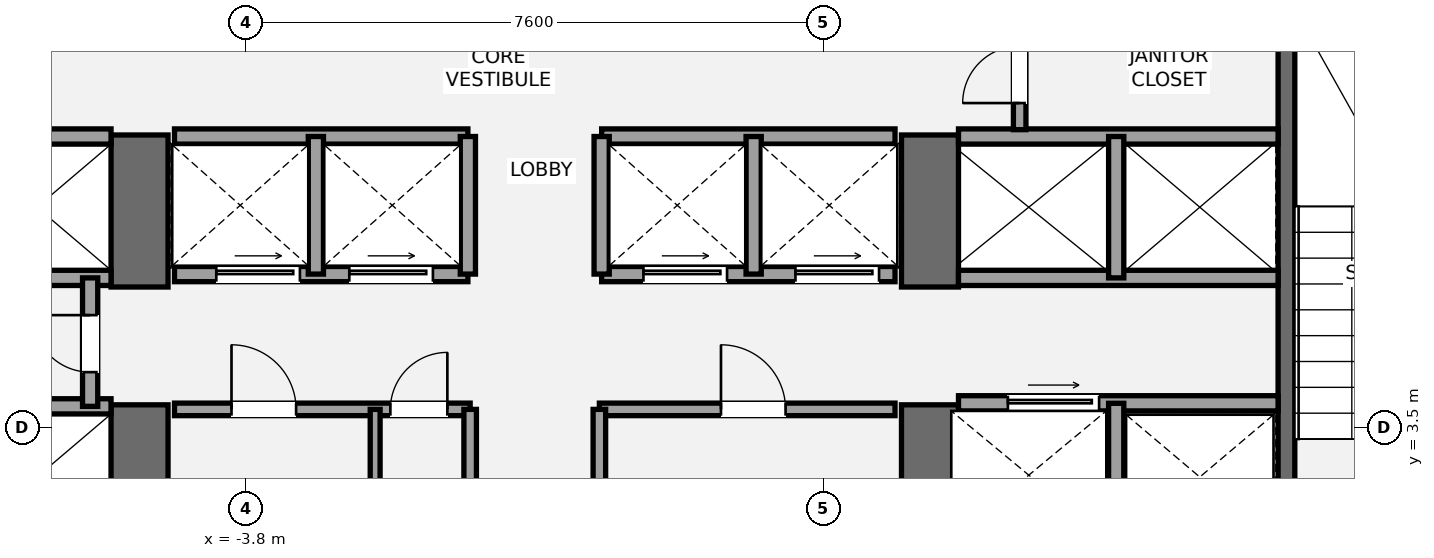
"""IFC4 building model, lengths in metres.
Left out: names, types, materials, properties, quantities, classifications, styles, units other than length and angle.
Written with IfcOpenShell. Run it as: python <this file> out.ifc"""

import sys

from ifc_helpers import new_model, si_unit, direction, frame, frame_2d, origin, place, context, subcontext, project, spatial, rectangle, extrude, element, fill, save


model = new_model("IFC4")
c1 = context("Model", 3, precision=1e-05, world=origin(), true_north=direction((0.0, 1.0)))
c2 = subcontext(c1, "Body", "Model", "MODEL_VIEW")
j1 = project(units=[si_unit("LENGTHUNIT", "METRE"), si_unit("PLANEANGLEUNIT", "RADIAN")], contexts=[c1])
p1 = place(None, origin())
s1 = spatial("IfcSite", under=j1, at=p1, CompositionType="ELEMENT")
p2 = place(p1, origin())
s2 = spatial("IfcBuilding", under=s1, at=p2, CompositionType="ELEMENT")
p3 = place(p2, frame((0.0, 0.0, 89.6)))
s3 = spatial("IfcBuildingStorey", under=s2, at=p3, CompositionType="ELEMENT", Elevation=89.6)
p4 = place(p3, frame((-5.2, 1.1, 0.0), z_axis=(0.0, 0.0, 1.0), x_axis=(0.0, 1.0, 0.0)))
e1 = element("IfcWall", 1, at=p4, inside=s3, PredefinedType="SHEAR", context=c2, shape_type="SweptSolid", body=[
    extrude(rectangle(XDim=2.7, YDim=0.75, at=frame_2d((1.35, 0.0))), origin(), (0.0, 0.0, 1.0), 3.5),
])
p5 = place(p3, frame((-5.2, 5.35, 0.0), z_axis=(0.0, 0.0, 1.0), x_axis=(0.0, 1.0, 0.0)))
e2 = element("IfcWall", 2, at=p5, inside=s3, PredefinedType="SHEAR", context=c2, shape_type="SweptSolid", body=[
    extrude(rectangle(XDim=2.0, YDim=0.75, at=frame_2d((1.0, 0.0))), origin(), (0.0, 0.0, 1.0), 3.5),
])
p6 = place(p3, frame((5.2, 1.1, 0.0), z_axis=(0.0, 0.0, 1.0), x_axis=(0.0, 1.0, 0.0)))
e3 = element("IfcWall", 3, at=p6, inside=s3, PredefinedType="SHEAR", context=c2, shape_type="SweptSolid", body=[
    extrude(rectangle(XDim=2.7, YDim=0.75, at=frame_2d((1.35, 0.0))), origin(), (0.0, 0.0, 1.0), 3.5),
])
p7 = place(p3, frame((5.2, 5.35, 0.0), z_axis=(0.0, 0.0, 1.0), x_axis=(0.0, 1.0, 0.0)))
e4 = element("IfcWall", 4, at=p7, inside=s3, PredefinedType="SHEAR", context=c2, shape_type="SweptSolid", body=[
    extrude(rectangle(XDim=2.0, YDim=0.75, at=frame_2d((1.0, 0.0))), origin(), (0.0, 0.0, 1.0), 3.5),
])
p8 = place(p3, frame((9.89, 1.85, 0.0), z_axis=(0.0, 0.0, 1.0), x_axis=(0.0, 1.0, 0.0)))
e5 = element("IfcWall", 5, at=p8, inside=s3, PredefinedType="SHEAR", context=c2, shape_type="SweptSolid", body=[
    extrude(rectangle(XDim=7.15, YDim=0.22, at=frame_2d((3.575, 0.0))), origin(), (0.0, 0.0, 1.0), 3.5),
])
for number, where, z_axis, x_axis in (
    (6, (-9.78, 3.78, 0.0), (0.0, 0.0, 1.0), (1.0, 0.0, 0.0)),
    (7, (-9.78, 5.47, 0.0), (0.0, 0.0, 1.0), (1.0, 0.0, 0.0)),
    (8, (-9.78, 7.33, 0.0), (0.0, 0.0, 1.0), (1.0, 0.0, 0.0)),
):
    element("IfcWall", number, at=place(p3, frame(where, z_axis=z_axis, x_axis=x_axis)), inside=s3, PredefinedType="SOLIDWALL", context=c2, shape_type="SweptSolid", body=[
        extrude(rectangle(XDim=4.205, YDim=0.2, at=frame_2d((2.103, 0.0))), origin(), (0.0, 0.0, 1.0), 3.31),
    ])
p9 = place(p3, frame((-5.85, 3.78, 0.0), z_axis=(0.0, 0.0, 1.0), x_axis=(0.0, 1.0, 0.0)))
e9 = element("IfcWall", 9, at=p9, inside=s3, PredefinedType="SOLIDWALL", context=c2, shape_type="SweptSolid", body=[
    extrude(rectangle(XDim=1.69, YDim=0.2, at=frame_2d((0.845, 0.0))), origin(), (0.0, 0.0, 1.0), 3.31),
])
p10 = place(p9, frame((0.45, 0.0, 0.0)))
e10 = element("IfcOpeningElement", 10, at=p10, cuts=e9, PredefinedType="OPENING", context=c2, shape_type="SweptSolid", body=[
    extrude(rectangle(XDim=0.75, YDim=2.1, at=frame_2d((0.375, 1.05))), frame((0.0, 0.11, 0.0), z_axis=(0.0, -1.0, 0.0), x_axis=(1.0, 0.0, 0.0)), (0.0, 0.0, 1.0), 0.22),
])
p11 = place(p3, frame((5.575, 3.82, 0.0), z_axis=(0.0, 0.0, 1.0), x_axis=(1.0, 0.0, 0.0)))
e11 = element("IfcWall", 11, at=p11, inside=s3, PredefinedType="SOLIDWALL", context=c2, shape_type="SweptSolid", body=[
    extrude(rectangle(XDim=4.205, YDim=0.2, at=frame_2d((2.103, 0.0))), origin(), (0.0, 0.0, 1.0), 3.31),
])
p12 = place(p11, frame((0.65, 0.0, 0.0)))
e12 = element("IfcOpeningElement", 12, at=p12, cuts=e11, PredefinedType="OPENING", context=c2, shape_type="SweptSolid", body=[
    extrude(rectangle(XDim=1.2, YDim=2.2, at=frame_2d((0.6, 1.1))), frame((0.0, 0.11, 0.0), z_axis=(0.0, -1.0, 0.0), x_axis=(1.0, 0.0, 0.0)), (0.0, 0.0, 1.0), 0.22),
])
p13 = place(p3, frame((7.65, 1.85, 0.0), z_axis=(0.0, 0.0, 1.0), x_axis=(0.0, 1.0, 0.0)))
e13 = element("IfcWall", 13, at=p13, inside=s3, PredefinedType="SOLIDWALL", context=c2, shape_type="SweptSolid", body=[
    extrude(rectangle(XDim=1.97, YDim=0.2, at=frame_2d((0.985, 0.0))), origin(), (0.0, 0.0, 1.0), 3.31),
])
for number, where, z_axis, x_axis in (
    (14, (5.575, 5.47, 0.0), (0.0, 0.0, 1.0), (1.0, 0.0, 0.0)),
    (15, (5.575, 7.33, 0.0), (0.0, 0.0, 1.0), (1.0, 0.0, 0.0)),
):
    element("IfcWall", number, at=place(p3, frame(where, z_axis=z_axis, x_axis=x_axis)), inside=s3, PredefinedType="SOLIDWALL", context=c2, shape_type="SweptSolid", body=[
        extrude(rectangle(XDim=4.205, YDim=0.2, at=frame_2d((2.103, 0.0))), origin(), (0.0, 0.0, 1.0), 3.31),
    ])
p14 = place(p3, frame((7.65, 5.47, 0.0), z_axis=(0.0, 0.0, 1.0), x_axis=(0.0, 1.0, 0.0)))
e16 = element("IfcWall", 16, at=p14, inside=s3, PredefinedType="SOLIDWALL", context=c2, shape_type="SweptSolid", body=[
    extrude(rectangle(XDim=1.86, YDim=0.2, at=frame_2d((0.93, 0.0))), origin(), (0.0, 0.0, 1.0), 3.31),
])
p15 = place(p3, frame((-4.74, 3.74, 0.0), z_axis=(0.0, 0.0, 1.0), x_axis=(1.0, 0.0, 0.0)))
e17 = element("IfcWall", 17, at=p15, inside=s3, PredefinedType="PARTITIONING", context=c2, shape_type="SweptSolid", body=[
    extrude(rectangle(XDim=3.89, YDim=0.165, at=frame_2d((1.945, 0.0))), origin(), (0.0, 0.0, 1.0), 3.31),
])
p16 = place(p15, frame((0.75, 0.0, 0.0)))
e18 = element("IfcOpeningElement", 18, at=p16, cuts=e17, PredefinedType="OPENING", context=c2, shape_type="SweptSolid", body=[
    extrude(rectangle(XDim=0.85, YDim=2.1, at=frame_2d((0.425, 1.05))), frame((0.0, 0.093, 0.0), z_axis=(0.0, -1.0, 0.0), x_axis=(1.0, 0.0, 0.0)), (0.0, 0.0, 1.0), 0.185),
])
p17 = place(p15, frame((2.84, 0.0, 0.0)))
e19 = element("IfcOpeningElement", 19, at=p17, cuts=e17, PredefinedType="OPENING", context=c2, shape_type="SweptSolid", body=[
    extrude(rectangle(XDim=0.75, YDim=2.1, at=frame_2d((0.375, 1.05))), frame((0.0, 0.093, 0.0), z_axis=(0.0, -1.0, 0.0), x_axis=(1.0, 0.0, 0.0)), (0.0, 0.0, 1.0), 0.185),
])
p18 = place(p3, frame((-0.85, 1.92, 0.0), z_axis=(0.0, 0.0, 1.0), x_axis=(0.0, 1.0, 0.0)))
e20 = element("IfcWall", 20, at=p18, inside=s3, PredefinedType="PARTITIONING", context=c2, shape_type="SweptSolid", body=[
    extrude(rectangle(XDim=1.82, YDim=0.165, at=frame_2d((0.91, 0.0))), origin(), (0.0, 0.0, 1.0), 3.31),
])
p19 = place(p3, frame((0.85, 3.74, 0.0), z_axis=(0.0, 0.0, 1.0), x_axis=(1.0, 0.0, 0.0)))
e21 = element("IfcWall", 21, at=p19, inside=s3, PredefinedType="PARTITIONING", context=c2, shape_type="SweptSolid", body=[
    extrude(rectangle(XDim=3.89, YDim=0.165, at=frame_2d((1.945, 0.0))), origin(), (0.0, 0.0, 1.0), 3.31),
])
p20 = place(p19, frame((1.6, 0.0, 0.0)))
e22 = element("IfcOpeningElement", 22, at=p20, cuts=e21, PredefinedType="OPENING", context=c2, shape_type="SweptSolid", body=[
    extrude(rectangle(XDim=0.85, YDim=2.1, at=frame_2d((0.425, 1.05))), frame((0.0, 0.093, 0.0), z_axis=(0.0, -1.0, 0.0), x_axis=(1.0, 0.0, 0.0)), (0.0, 0.0, 1.0), 0.185),
])
p21 = place(p3, frame((0.85, 1.92, 0.0), z_axis=(0.0, 0.0, 1.0), x_axis=(0.0, 1.0, 0.0)))
e23 = element("IfcWall", 23, at=p21, inside=s3, PredefinedType="PARTITIONING", context=c2, shape_type="SweptSolid", body=[
    extrude(rectangle(XDim=1.82, YDim=0.165, at=frame_2d((0.91, 0.0))), origin(), (0.0, 0.0, 1.0), 3.31),
])
p22 = place(p3, frame((-2.1, 1.92, 0.0), z_axis=(0.0, 0.0, 1.0), x_axis=(0.0, 1.0, 0.0)))
e24 = element("IfcWall", 24, at=p22, inside=s3, PredefinedType="PARTITIONING", context=c2, shape_type="SweptSolid", body=[
    extrude(rectangle(XDim=1.82, YDim=0.13, at=frame_2d((0.91, 0.0))), origin(), (0.0, 0.0, 1.0), 3.31),
])
p23 = place(p3, frame((-4.74, 5.52, 0.0), z_axis=(0.0, 0.0, 1.0), x_axis=(1.0, 0.0, 0.0)))
e25 = element("IfcWall", 25, at=p23, inside=s3, PredefinedType="SOLIDWALL", context=c2, shape_type="SweptSolid", body=[
    extrude(rectangle(XDim=3.86, YDim=0.2, at=frame_2d((1.93, 0.0))), origin(), (0.0, 0.0, 1.0), 3.31),
])
p24 = place(p23, frame((0.55, 0.0, 0.0)))
e26 = element("IfcOpeningElement", 26, at=p24, cuts=e25, PredefinedType="OPENING", context=c2, shape_type="SweptSolid", body=[
    extrude(rectangle(XDim=1.1, YDim=2.2, at=frame_2d((0.55, 1.1))), frame((0.0, 0.11, 0.0), z_axis=(0.0, -1.0, 0.0), x_axis=(1.0, 0.0, 0.0)), (0.0, 0.0, 1.0), 0.22),
])
p25 = place(p23, frame((2.3, 0.0, 0.0)))
e27 = element("IfcOpeningElement", 27, at=p25, cuts=e25, PredefinedType="OPENING", context=c2, shape_type="SweptSolid", body=[
    extrude(rectangle(XDim=1.1, YDim=2.2, at=frame_2d((0.55, 1.1))), frame((0.0, 0.11, 0.0), z_axis=(0.0, -1.0, 0.0), x_axis=(1.0, 0.0, 0.0)), (0.0, 0.0, 1.0), 0.22),
])
p26 = place(p3, frame((0.88, 5.52, 0.0), z_axis=(0.0, 0.0, 1.0), x_axis=(1.0, 0.0, 0.0)))
e28 = element("IfcWall", 28, at=p26, inside=s3, PredefinedType="SOLIDWALL", context=c2, shape_type="SweptSolid", body=[
    extrude(rectangle(XDim=3.86, YDim=0.2, at=frame_2d((1.93, 0.0))), origin(), (0.0, 0.0, 1.0), 3.31),
])
p27 = place(p26, frame((0.55, 0.0, 0.0)))
e29 = element("IfcOpeningElement", 29, at=p27, cuts=e28, PredefinedType="OPENING", context=c2, shape_type="SweptSolid", body=[
    extrude(rectangle(XDim=1.1, YDim=2.2, at=frame_2d((0.55, 1.1))), frame((0.0, 0.11, 0.0), z_axis=(0.0, -1.0, 0.0), x_axis=(1.0, 0.0, 0.0)), (0.0, 0.0, 1.0), 0.22),
])
p28 = place(p26, frame((2.55, 0.0, 0.0)))
e30 = element("IfcOpeningElement", 30, at=p28, cuts=e28, PredefinedType="OPENING", context=c2, shape_type="SweptSolid", body=[
    extrude(rectangle(XDim=1.1, YDim=2.2, at=frame_2d((0.55, 1.1))), frame((0.0, 0.11, 0.0), z_axis=(0.0, -1.0, 0.0), x_axis=(1.0, 0.0, 0.0)), (0.0, 0.0, 1.0), 0.22),
])
for number, where, z_axis, x_axis in (
    (31, (-4.74, 7.33, 0.0), (0.0, 0.0, 1.0), (1.0, 0.0, 0.0)),
    (32, (0.88, 7.33, 0.0), (0.0, 0.0, 1.0), (1.0, 0.0, 0.0)),
):
    element("IfcWall", number, at=place(p3, frame(where, z_axis=z_axis, x_axis=x_axis)), inside=s3, PredefinedType="SOLIDWALL", context=c2, shape_type="SweptSolid", body=[
        extrude(rectangle(XDim=3.86, YDim=0.2, at=frame_2d((1.93, 0.0))), origin(), (0.0, 0.0, 1.0), 3.31),
    ])
for number, where, z_axis, x_axis in (
    (33, (-2.88, 5.52, 0.0), (0.0, 0.0, 1.0), (0.0, 1.0, 0.0)),
    (34, (2.88, 5.52, 0.0), (0.0, 0.0, 1.0), (0.0, 1.0, 0.0)),
    (35, (-0.88, 5.52, 0.0), (0.0, 0.0, 1.0), (0.0, 1.0, 0.0)),
    (36, (0.88, 5.52, 0.0), (0.0, 0.0, 1.0), (0.0, 1.0, 0.0)),
):
    element("IfcWall", number, at=place(p3, frame(where, z_axis=z_axis, x_axis=x_axis)), inside=s3, PredefinedType="SOLIDWALL", context=c2, shape_type="SweptSolid", body=[
        extrude(rectangle(XDim=1.81, YDim=0.2, at=frame_2d((0.905, 0.0))), origin(), (0.0, 0.0, 1.0), 3.31),
    ])
p29 = place(p3, frame((6.38, 7.42, 0.0), z_axis=(0.0, 0.0, 1.0), x_axis=(0.0, 1.0, 0.0)))
e37 = element("IfcWall", 37, at=p29, inside=s3, PredefinedType="PARTITIONING", context=c2, shape_type="SweptSolid", body=[
    extrude(rectangle(XDim=1.58, YDim=0.165, at=frame_2d((0.79, 0.0))), origin(), (0.0, 0.0, 1.0), 3.31),
])
p30 = place(p29, frame((0.35, 0.0, 0.0)))
e38 = element("IfcOpeningElement", 38, at=p30, cuts=e37, PredefinedType="OPENING", context=c2, shape_type="SweptSolid", body=[
    extrude(rectangle(XDim=0.75, YDim=2.1, at=frame_2d((0.375, 1.05))), frame((0.0, 0.093, 0.0), z_axis=(0.0, -1.0, 0.0), x_axis=(1.0, 0.0, 0.0)), (0.0, 0.0, 1.0), 0.185),
])
p31 = place(p10, origin())
e39 = element("IfcDoor", 39, at=p31, inside=s3, OperationType="SINGLE_SWING_RIGHT", PredefinedType="DOOR", context=c2, shape_type="SweptSolid", body=[
    extrude(rectangle(XDim=0.75, YDim=2.1, at=frame_2d((0.375, 1.05))), frame((0.0, 0.025, 0.0), z_axis=(0.0, -1.0, 0.0), x_axis=(1.0, 0.0, 0.0)), (0.0, 0.0, 1.0), 0.05),
])
fill(e10, e39)
p32 = place(p12, origin())
e40 = element("IfcDoor", 40, at=p32, inside=s3, OperationType="SLIDING_TO_RIGHT", PredefinedType="DOOR", context=c2, shape_type="SweptSolid", body=[
    extrude(rectangle(XDim=1.2, YDim=2.2, at=frame_2d((0.6, 1.1))), frame((0.0, 0.025, 0.0), z_axis=(0.0, -1.0, 0.0), x_axis=(1.0, 0.0, 0.0)), (0.0, 0.0, 1.0), 0.05),
])
fill(e12, e40)
p33 = place(p16, origin())
e41 = element("IfcDoor", 41, at=p33, inside=s3, OperationType="SINGLE_SWING_LEFT", PredefinedType="DOOR", context=c2, shape_type="SweptSolid", body=[
    extrude(rectangle(XDim=0.85, YDim=2.1, at=frame_2d((0.425, 1.05))), frame((0.0, 0.025, 0.0), z_axis=(0.0, -1.0, 0.0), x_axis=(1.0, 0.0, 0.0)), (0.0, 0.0, 1.0), 0.05),
])
fill(e18, e41)
p34 = place(p17, origin())
e42 = element("IfcDoor", 42, at=p34, inside=s3, OperationType="SINGLE_SWING_RIGHT", PredefinedType="DOOR", context=c2, shape_type="SweptSolid", body=[
    extrude(rectangle(XDim=0.75, YDim=2.1, at=frame_2d((0.375, 1.05))), frame((0.0, 0.025, 0.0), z_axis=(0.0, -1.0, 0.0), x_axis=(1.0, 0.0, 0.0)), (0.0, 0.0, 1.0), 0.05),
])
fill(e19, e42)
p35 = place(p20, origin())
e43 = element("IfcDoor", 43, at=p35, inside=s3, OperationType="SINGLE_SWING_LEFT", PredefinedType="DOOR", context=c2, shape_type="SweptSolid", body=[
    extrude(rectangle(XDim=0.85, YDim=2.1, at=frame_2d((0.425, 1.05))), frame((0.0, 0.025, 0.0), z_axis=(0.0, -1.0, 0.0), x_axis=(1.0, 0.0, 0.0)), (0.0, 0.0, 1.0), 0.05),
])
fill(e22, e43)
p36 = place(p24, origin())
e44 = element("IfcDoor", 44, at=p36, inside=s3, OperationType="SLIDING_TO_LEFT", PredefinedType="DOOR", context=c2, shape_type="SweptSolid", body=[
    extrude(rectangle(XDim=1.1, YDim=2.2, at=frame_2d((0.55, 1.1))), frame((0.0, 0.025, 0.0), z_axis=(0.0, -1.0, 0.0), x_axis=(1.0, 0.0, 0.0)), (0.0, 0.0, 1.0), 0.05),
])
fill(e26, e44)
p37 = place(p25, origin())
e45 = element("IfcDoor", 45, at=p37, inside=s3, OperationType="SLIDING_TO_LEFT", PredefinedType="DOOR", context=c2, shape_type="SweptSolid", body=[
    extrude(rectangle(XDim=1.1, YDim=2.2, at=frame_2d((0.55, 1.1))), frame((0.0, 0.025, 0.0), z_axis=(0.0, -1.0, 0.0), x_axis=(1.0, 0.0, 0.0)), (0.0, 0.0, 1.0), 0.05),
])
fill(e27, e45)
p38 = place(p27, origin())
e46 = element("IfcDoor", 46, at=p38, inside=s3, OperationType="SLIDING_TO_LEFT", PredefinedType="DOOR", context=c2, shape_type="SweptSolid", body=[
    extrude(rectangle(XDim=1.1, YDim=2.2, at=frame_2d((0.55, 1.1))), frame((0.0, 0.025, 0.0), z_axis=(0.0, -1.0, 0.0), x_axis=(1.0, 0.0, 0.0)), (0.0, 0.0, 1.0), 0.05),
])
fill(e29, e46)
p39 = place(p28, origin())
e47 = element("IfcDoor", 47, at=p39, inside=s3, OperationType="SLIDING_TO_LEFT", PredefinedType="DOOR", context=c2, shape_type="SweptSolid", body=[
    extrude(rectangle(XDim=1.1, YDim=2.2, at=frame_2d((0.55, 1.1))), frame((0.0, 0.025, 0.0), z_axis=(0.0, -1.0, 0.0), x_axis=(1.0, 0.0, 0.0)), (0.0, 0.0, 1.0), 0.05),
])
fill(e30, e47)
p40 = place(p30, origin())
e48 = element("IfcDoor", 48, at=p40, inside=s3, OperationType="SINGLE_SWING_LEFT", PredefinedType="DOOR", context=c2, shape_type="SweptSolid", body=[
    extrude(rectangle(XDim=0.75, YDim=2.1, at=frame_2d((0.375, 1.05))), frame((0.0, 0.025, 0.0), z_axis=(0.0, -1.0, 0.0), x_axis=(1.0, 0.0, 0.0)), (0.0, 0.0, 1.0), 0.05),
])
fill(e38, e48)
save(model, sys.argv[1])
